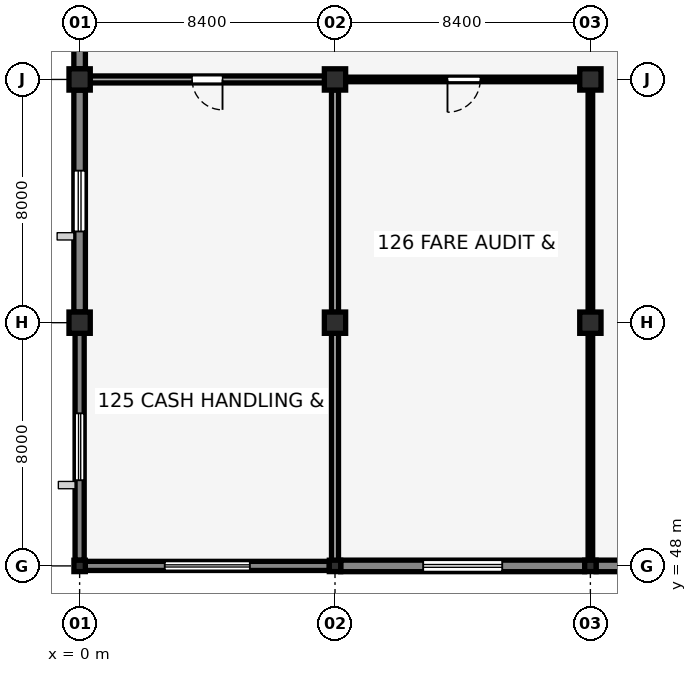
"""IFC4 building model, lengths in metres.
Left out: names, types, materials, properties, quantities, classifications, styles, units other than length and angle.
Written with IfcOpenShell. Run it as: python <this file> out.ifc"""

import sys

from ifc_helpers import new_model, si_unit, direction, frame, frame_2d, origin, origin_2d, place, context, subcontext, project, spatial, rectangle, i_section, extrude, element, fill, save


model = new_model("IFC4")
c1 = context("Model", 3, precision=1e-05, world=origin(), true_north=direction((0.0, 1.0)))
c2 = subcontext(c1, "Body", "Model", "MODEL_VIEW")
j1 = project(units=[si_unit("LENGTHUNIT", "METRE"), si_unit("PLANEANGLEUNIT", "RADIAN")], contexts=[c1])
p1 = place(None, origin())
s1 = spatial("IfcSite", under=j1, at=p1, CompositionType="ELEMENT")
p2 = place(p1, origin())
s2 = spatial("IfcBuilding", under=s1, at=p2, CompositionType="ELEMENT")
p3 = place(p2, frame((0.0, 0.0, 5.44)))
s3 = spatial("IfcBuildingStorey", under=s2, at=p3, CompositionType="ELEMENT", Elevation=5.44)
p4 = place(p3, frame((0.0, 48.0, 0.0), z_axis=(0.0, 0.0, 1.0), x_axis=(1.0, 0.0, 0.0)))
e1 = element("IfcColumn", 1, at=p4, inside=s3, PredefinedType="COLUMN", context=c2, shape_type="SweptSolid", body=[
    extrude(i_section(OverallWidth=0.375, OverallDepth=0.375, WebThickness=0.017, FlangeThickness=0.027, FilletRadius=0.015, at=origin_2d()), origin(), (0.0, 0.0, 1.0), 3.8),
])
for number, where, z_axis, x_axis in (
    (2, (0.0, 56.0, 0.0), (0.0, 0.0, 1.0), (1.0, 0.0, 0.0)),
    (3, (0.0, 64.0, 0.0), (0.0, 0.0, 1.0), (1.0, 0.0, 0.0)),
):
    element("IfcColumn", number, at=place(p3, frame(where, z_axis=z_axis, x_axis=x_axis)), inside=s3, PredefinedType="COLUMN", context=c2, shape_type="SweptSolid", body=[
        extrude(rectangle(XDim=0.7, YDim=0.7, at=origin_2d()), origin(), (0.0, 0.0, 1.0), 3.8),
    ])
p5 = place(p3, frame((8.4, 48.0, 0.0), z_axis=(0.0, 0.0, 1.0), x_axis=(1.0, 0.0, 0.0)))
e4 = element("IfcColumn", 4, at=p5, inside=s3, PredefinedType="COLUMN", context=c2, shape_type="SweptSolid", body=[
    extrude(i_section(OverallWidth=0.375, OverallDepth=0.375, WebThickness=0.017, FlangeThickness=0.027, FilletRadius=0.015, at=origin_2d()), origin(), (0.0, 0.0, 1.0), 3.8),
])
for number, where, z_axis, x_axis in (
    (5, (8.4, 56.0, 0.0), (0.0, 0.0, 1.0), (1.0, 0.0, 0.0)),
    (6, (8.4, 64.0, 0.0), (0.0, 0.0, 1.0), (1.0, 0.0, 0.0)),
):
    element("IfcColumn", number, at=place(p3, frame(where, z_axis=z_axis, x_axis=x_axis)), inside=s3, PredefinedType="COLUMN", context=c2, shape_type="SweptSolid", body=[
        extrude(rectangle(XDim=0.7, YDim=0.7, at=origin_2d()), origin(), (0.0, 0.0, 1.0), 3.8),
    ])
p6 = place(p3, frame((16.8, 48.0, 0.0), z_axis=(0.0, 0.0, 1.0), x_axis=(1.0, 0.0, 0.0)))
e7 = element("IfcColumn", 7, at=p6, inside=s3, PredefinedType="COLUMN", context=c2, shape_type="SweptSolid", body=[
    extrude(i_section(OverallWidth=0.375, OverallDepth=0.375, WebThickness=0.017, FlangeThickness=0.027, FilletRadius=0.015, at=origin_2d()), origin(), (0.0, 0.0, 1.0), 3.8),
])
for number, where, z_axis, x_axis in (
    (8, (16.8, 56.0, 0.0), (0.0, 0.0, 1.0), (1.0, 0.0, 0.0)),
    (9, (16.8, 64.0, 0.0), (0.0, 0.0, 1.0), (1.0, 0.0, 0.0)),
):
    element("IfcColumn", number, at=place(p3, frame(where, z_axis=z_axis, x_axis=x_axis)), inside=s3, PredefinedType="COLUMN", context=c2, shape_type="SweptSolid", body=[
        extrude(rectangle(XDim=0.7, YDim=0.7, at=origin_2d()), origin(), (0.0, 0.0, 1.0), 3.8),
    ])
p7 = place(p3, frame((0.187, 48.0, 0.0), z_axis=(0.0, 0.0, 1.0), x_axis=(1.0, 0.0, 0.0)))
e10 = element("IfcWall", 10, at=p7, inside=s3, PredefinedType="SOLIDWALL", context=c2, shape_type="SweptSolid", body=[
    extrude(rectangle(XDim=8.025, YDim=0.3, at=frame_2d((4.013, 0.0))), origin(), (0.0, 0.0, 1.0), 3.45),
])
p8 = place(p7, frame((2.613, 0.0, 0.9), z_axis=(0.0, 0.0, 1.0), x_axis=(1.0, 0.0, 0.0)))
e11 = element("IfcOpeningElement", 11, at=p8, cuts=e10, PredefinedType="OPENING", context=c2, shape_type="SweptSolid", body=[
    extrude(rectangle(XDim=2.8, YDim=1.6, at=frame_2d((1.4, 0.8))), frame((0.0, 0.16, 0.0), z_axis=(0.0, -1.0, 0.0), x_axis=(1.0, 0.0, 0.0)), (0.0, 0.0, 1.0), 0.32),
])
p9 = place(p3, frame((8.587, 48.0, 0.0), z_axis=(0.0, 0.0, 1.0), x_axis=(1.0, 0.0, 0.0)))
e12 = element("IfcWall", 12, at=p9, inside=s3, PredefinedType="SOLIDWALL", context=c2, shape_type="SweptSolid", body=[
    extrude(rectangle(XDim=8.025, YDim=0.38, at=frame_2d((4.013, 0.0))), origin(), (0.0, 0.0, 1.0), 3.45),
])
p10 = place(p9, frame((2.713, 0.0, 0.9), z_axis=(0.0, 0.0, 1.0), x_axis=(1.0, 0.0, 0.0)))
e13 = element("IfcOpeningElement", 13, at=p10, cuts=e12, PredefinedType="OPENING", context=c2, shape_type="SweptSolid", body=[
    extrude(rectangle(XDim=2.6, YDim=1.8, at=frame_2d((1.3, 0.9))), frame((0.0, 0.2, 0.0), z_axis=(0.0, -1.0, 0.0), x_axis=(1.0, 0.0, 0.0)), (0.0, 0.0, 1.0), 0.4),
])
p11 = place(p3, frame((16.987, 48.0, 0.0), z_axis=(0.0, 0.0, 1.0), x_axis=(1.0, 0.0, 0.0)))
e14 = element("IfcWall", 14, at=p11, inside=s3, PredefinedType="SOLIDWALL", context=c2, shape_type="SweptSolid", body=[
    extrude(rectangle(XDim=8.025, YDim=0.38, at=frame_2d((4.013, 0.0))), origin(), (0.0, 0.0, 1.0), 3.45),
])
p12 = place(p11, frame((2.813, 0.0, 0.9), z_axis=(0.0, 0.0, 1.0), x_axis=(1.0, 0.0, 0.0)))
e15 = element("IfcOpeningElement", 15, at=p12, cuts=e14, PredefinedType="OPENING", context=c2, shape_type="SweptSolid", body=[
    extrude(rectangle(XDim=2.4, YDim=1.75, at=frame_2d((1.2, 0.875))), frame((0.0, 0.2, 0.0), z_axis=(0.0, -1.0, 0.0), x_axis=(1.0, 0.0, 0.0)), (0.0, 0.0, 1.0), 0.4),
])
p13 = place(p3, frame((0.0, 48.187, 0.0), z_axis=(0.0, 0.0, 1.0), x_axis=(0.0, 1.0, 0.0)))
e16 = element("IfcWall", 16, at=p13, inside=s3, PredefinedType="SOLIDWALL", context=c2, shape_type="SweptSolid", body=[
    extrude(rectangle(XDim=7.463, YDim=0.3, at=frame_2d((3.731, 0.0))), origin(), (0.0, 0.0, 1.0), 3.442),
])
p14 = place(p13, frame((2.631, 0.0, 0.9), z_axis=(0.0, 0.0, 1.0), x_axis=(1.0, 0.0, 0.0)))
e17 = element("IfcOpeningElement", 17, at=p14, cuts=e16, PredefinedType="OPENING", context=c2, shape_type="SweptSolid", body=[
    extrude(rectangle(XDim=2.2, YDim=1.5, at=frame_2d((1.1, 0.75))), frame((0.0, 0.16, 0.0), z_axis=(0.0, -1.0, 0.0), x_axis=(1.0, 0.0, 0.0)), (0.0, 0.0, 1.0), 0.32),
])
p15 = place(p3, frame((0.0, 56.35, 0.0), z_axis=(0.0, 0.0, 1.0), x_axis=(0.0, 1.0, 0.0)))
e18 = element("IfcWall", 18, at=p15, inside=s3, PredefinedType="SOLIDWALL", context=c2, shape_type="SweptSolid", body=[
    extrude(rectangle(XDim=7.3, YDim=0.38, at=frame_2d((3.65, 0.0))), origin(), (0.0, 0.0, 1.0), 3.442),
])
p16 = place(p15, frame((2.65, 0.0, 0.9), z_axis=(0.0, 0.0, 1.0), x_axis=(1.0, 0.0, 0.0)))
e19 = element("IfcOpeningElement", 19, at=p16, cuts=e18, PredefinedType="OPENING", context=c2, shape_type="SweptSolid", body=[
    extrude(rectangle(XDim=2.0, YDim=1.5, at=frame_2d((1.0, 0.75))), frame((0.0, 0.2, 0.0), z_axis=(0.0, -1.0, 0.0), x_axis=(1.0, 0.0, 0.0)), (0.0, 0.0, 1.0), 0.4),
])
p17 = place(p3, frame((0.0, 64.35, 0.0), z_axis=(0.0, 0.0, 1.0), x_axis=(0.0, 1.0, 0.0)))
e20 = element("IfcWall", 20, at=p17, inside=s3, PredefinedType="SOLIDWALL", context=c2, shape_type="SweptSolid", body=[
    extrude(rectangle(XDim=7.3, YDim=0.38, at=frame_2d((3.65, 0.0))), origin(), (0.0, 0.0, 1.0), 3.5),
])
p18 = place(p3, frame((0.34, 64.0, 0.0), z_axis=(0.0, 0.0, 1.0), x_axis=(1.0, 0.0, 0.0)))
e21 = element("IfcWall", 21, at=p18, inside=s3, PredefinedType="PARTITIONING", context=c2, shape_type="SweptSolid", body=[
    extrude(rectangle(XDim=7.72, YDim=0.23, at=frame_2d((3.86, 0.0))), origin(), (0.0, 0.0, 1.0), 3.26),
])
p19 = place(p18, frame((4.36, 0.0, 0.0), z_axis=(0.0, 0.0, 1.0), x_axis=(-1.0, 0.0, 0.0)))
e22 = element("IfcOpeningElement", 22, at=p19, cuts=e21, PredefinedType="OPENING", context=c2, shape_type="SweptSolid", body=[
    extrude(rectangle(XDim=1.0, YDim=2.15, at=frame_2d((0.5, 1.075))), frame((0.0, 0.125, 0.0), z_axis=(0.0, -1.0, 0.0), x_axis=(1.0, 0.0, 0.0)), (0.0, 0.0, 1.0), 0.25),
])
p20 = place(p3, frame((8.74, 64.0, 0.0), z_axis=(0.0, 0.0, 1.0), x_axis=(1.0, 0.0, 0.0)))
e23 = element("IfcWall", 23, at=p20, inside=s3, PredefinedType="PARTITIONING", context=c2, shape_type="SweptSolid", body=[
    extrude(rectangle(XDim=7.72, YDim=0.15, at=frame_2d((3.86, 0.0))), origin(), (0.0, 0.0, 1.0), 3.26),
])
p21 = place(p20, frame((4.44, 0.0, 0.0), z_axis=(0.0, 0.0, 1.0), x_axis=(-1.0, 0.0, 0.0)))
e24 = element("IfcOpeningElement", 24, at=p21, cuts=e23, PredefinedType="OPENING", context=c2, shape_type="SweptSolid", body=[
    extrude(rectangle(XDim=1.08, YDim=2.18, at=frame_2d((0.54, 1.09))), frame((0.0, 0.085, 0.0), z_axis=(0.0, -1.0, 0.0), x_axis=(1.0, 0.0, 0.0)), (0.0, 0.0, 1.0), 0.17),
])
p22 = place(p3, frame((8.4, 48.177, 0.0), z_axis=(0.0, 0.0, 1.0), x_axis=(0.0, 1.0, 0.0)))
e25 = element("IfcWall", 25, at=p22, inside=s3, PredefinedType="PARTITIONING", context=c2, shape_type="SweptSolid", body=[
    extrude(rectangle(XDim=7.483, YDim=0.23, at=frame_2d((3.741, 0.0))), origin(), (0.0, 0.0, 1.0), 3.337),
])
p23 = place(p3, frame((8.4, 56.34, 0.0), z_axis=(0.0, 0.0, 1.0), x_axis=(0.0, 1.0, 0.0)))
e26 = element("IfcWall", 26, at=p23, inside=s3, PredefinedType="PARTITIONING", context=c2, shape_type="SweptSolid", body=[
    extrude(rectangle(XDim=7.32, YDim=0.23, at=frame_2d((3.66, 0.0))), origin(), (0.0, 0.0, 1.0), 3.337),
])
p24 = place(p3, frame((16.8, 48.177, 0.0), z_axis=(0.0, 0.0, 1.0), x_axis=(0.0, 1.0, 0.0)))
e27 = element("IfcWall", 27, at=p24, inside=s3, PredefinedType="PARTITIONING", context=c2, shape_type="SweptSolid", body=[
    extrude(rectangle(XDim=7.483, YDim=0.15, at=frame_2d((3.741, 0.0))), origin(), (0.0, 0.0, 1.0), 3.337),
])
p25 = place(p3, frame((16.8, 56.34, 0.0), z_axis=(0.0, 0.0, 1.0), x_axis=(0.0, 1.0, 0.0)))
e28 = element("IfcWall", 28, at=p25, inside=s3, PredefinedType="PARTITIONING", context=c2, shape_type="SweptSolid", body=[
    extrude(rectangle(XDim=7.32, YDim=0.15, at=frame_2d((3.66, 0.0))), origin(), (0.0, 0.0, 1.0), 3.337),
])
p26 = place(p8, origin())
e29 = element("IfcWindow", 29, at=p26, inside=s3, PartitioningType="DOUBLE_PANEL_VERTICAL", PredefinedType="WINDOW", context=c2, shape_type="SweptSolid", body=[
    extrude(rectangle(XDim=2.8, YDim=1.6, at=frame_2d((1.4, 0.8))), frame((0.0, 0.03, 0.0), z_axis=(0.0, -1.0, 0.0), x_axis=(1.0, 0.0, 0.0)), (0.0, 0.0, 1.0), 0.06),
])
fill(e11, e29)
p27 = place(p10, origin())
e30 = element("IfcWindow", 30, at=p27, inside=s3, PartitioningType="DOUBLE_PANEL_VERTICAL", PredefinedType="WINDOW", context=c2, shape_type="SweptSolid", body=[
    extrude(rectangle(XDim=2.6, YDim=1.8, at=frame_2d((1.3, 0.9))), frame((0.0, 0.03, 0.0), z_axis=(0.0, -1.0, 0.0), x_axis=(1.0, 0.0, 0.0)), (0.0, 0.0, 1.0), 0.06),
])
fill(e13, e30)
p28 = place(p14, origin())
e31 = element("IfcWindow", 31, at=p28, inside=s3, PartitioningType="DOUBLE_PANEL_VERTICAL", PredefinedType="WINDOW", context=c2, shape_type="SweptSolid", body=[
    extrude(rectangle(XDim=2.2, YDim=1.5, at=frame_2d((1.1, 0.75))), frame((0.0, 0.03, 0.0), z_axis=(0.0, -1.0, 0.0), x_axis=(1.0, 0.0, 0.0)), (0.0, 0.0, 1.0), 0.06),
])
fill(e17, e31)
p29 = place(p16, origin())
e32 = element("IfcWindow", 32, at=p29, inside=s3, PartitioningType="DOUBLE_PANEL_VERTICAL", PredefinedType="WINDOW", context=c2, shape_type="SweptSolid", body=[
    extrude(rectangle(XDim=2.0, YDim=1.5, at=frame_2d((1.0, 0.75))), frame((0.0, 0.03, 0.0), z_axis=(0.0, -1.0, 0.0), x_axis=(1.0, 0.0, 0.0)), (0.0, 0.0, 1.0), 0.06),
])
fill(e19, e32)
p30 = place(p19, origin())
e33 = element("IfcDoor", 33, at=p30, inside=s3, OperationType="SINGLE_SWING_LEFT", PredefinedType="DOOR", context=c2, shape_type="SweptSolid", body=[
    extrude(rectangle(XDim=1.0, YDim=2.15, at=frame_2d((0.5, 1.075))), frame((0.0, 0.025, 0.0), z_axis=(0.0, -1.0, 0.0), x_axis=(1.0, 0.0, 0.0)), (0.0, 0.0, 1.0), 0.05),
])
fill(e22, e33)
p31 = place(p21, origin())
e34 = element("IfcDoor", 34, at=p31, inside=s3, OperationType="SINGLE_SWING_RIGHT", PredefinedType="DOOR", context=c2, shape_type="SweptSolid", body=[
    extrude(rectangle(XDim=1.08, YDim=2.18, at=frame_2d((0.54, 1.09))), frame((0.0, 0.025, 0.0), z_axis=(0.0, -1.0, 0.0), x_axis=(1.0, 0.0, 0.0)), (0.0, 0.0, 1.0), 0.05),
])
fill(e24, e34)
save(model, sys.argv[1])
